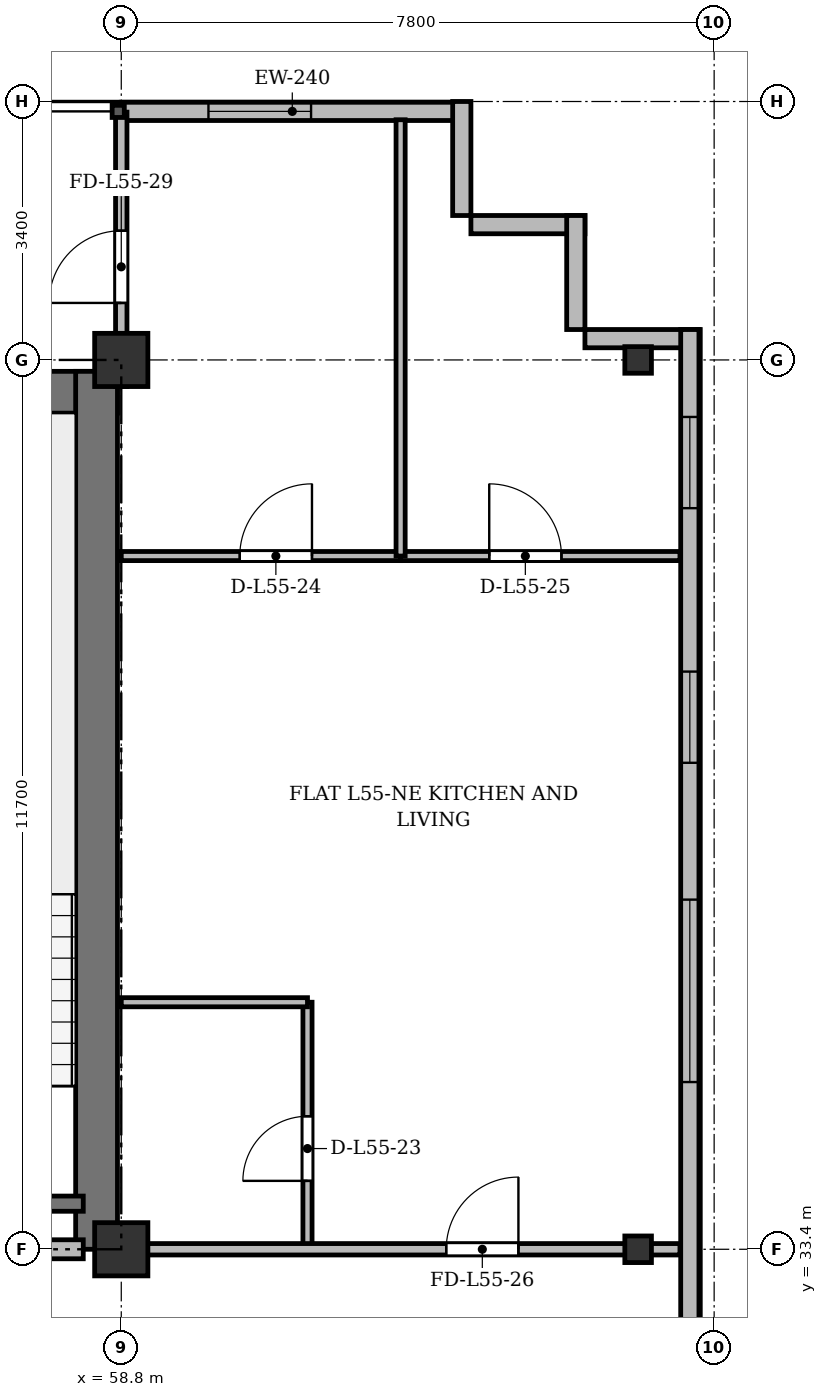
"""IFC4 building model, lengths in metres.
Left out: names, types, materials, properties, quantities, classifications, styles, units other than length and angle.
Written with IfcOpenShell. Run it as: python <this file> out.ifc"""

import sys

from ifc_helpers import new_model, si_unit, direction, frame, frame_2d, origin, origin_2d, place, context, subcontext, project, spatial, rectangle, i_section, extrude, source, transform, mapped, element, fill, save


model = new_model("IFC4")
c1 = context("Model", 3, precision=1e-05, world=origin(), true_north=direction((0.0, 1.0)))
c2 = subcontext(c1, "Body", "Model", "MODEL_VIEW")
j1 = project(units=[si_unit("LENGTHUNIT", "METRE"), si_unit("PLANEANGLEUNIT", "RADIAN")], contexts=[c1])
p1 = place(None, origin())
s1 = spatial("IfcSite", under=j1, at=p1, CompositionType="ELEMENT")
p2 = place(p1, origin())
s2 = spatial("IfcBuilding", under=s1, at=p2, CompositionType="ELEMENT")
p3 = place(p2, frame((0.0, 0.0, 212.1)))
s3 = spatial("IfcBuildingStorey", under=s2, at=p3, CompositionType="ELEMENT", Elevation=212.1)
m1 = source(origin(), c2, "Body", "SweptSolid", [
    extrude(rectangle(XDim=0.7, YDim=0.7, at=origin_2d()), origin(), (0.0, 0.0, 1.0), 3.6),
])
for number, where, z_axis, x_axis in (
    (1, (58.8, 33.4, 0.0), (0.0, 0.0, 1.0), (1.0, 0.0, 0.0)),
    (2, (58.8, 45.1, 0.0), (0.0, 0.0, 1.0), (1.0, 0.0, 0.0)),
):
    element("IfcColumn", number, at=place(p3, frame(where, z_axis=z_axis, x_axis=x_axis)), inside=s3, PredefinedType="COLUMN", context=c2, shape_type="MappedRepresentation", body=[
        mapped(m1, transform((0.0, 0.0, 0.0), x_axis=(1.0, 0.0, 0.0), y_axis=(0.0, 1.0, 0.0), z_axis=(0.0, 0.0, 1.0), scale=1.0)),
    ])
m2 = source(origin(), c2, "Body", "SweptSolid", [
    extrude(i_section(OverallWidth=0.35, OverallDepth=0.35, WebThickness=0.018, FlangeThickness=0.028, at=origin_2d()), origin(), (0.0, 0.0, 1.0), 3.6),
])
for number, where, z_axis, x_axis in (
    (3, (65.6, 33.4, 0.0), (0.0, 0.0, 1.0), (1.0, 0.0, 0.0)),
    (4, (65.6, 45.1, 0.0), (0.0, 0.0, 1.0), (1.0, 0.0, 0.0)),
):
    element("IfcColumn", number, at=place(p3, frame(where, z_axis=z_axis, x_axis=x_axis)), inside=s3, PredefinedType="COLUMN", context=c2, shape_type="MappedRepresentation", body=[
        mapped(m2, transform((0.0, 0.0, 0.0), x_axis=(1.0, 0.0, 0.0), y_axis=(0.0, 1.0, 0.0), z_axis=(0.0, 0.0, 1.0), scale=1.0)),
    ])
p4 = place(p3, frame((58.8, 48.37, 0.0), z_axis=(0.0, 0.0, 1.0), x_axis=(1.0, 0.0, 0.0)))
e5 = element("IfcWall", 5, at=p4, inside=s3, PredefinedType="SOLIDWALL", context=c2, shape_type="SweptSolid", body=[
    extrude(rectangle(XDim=4.5, YDim=0.24, at=frame_2d((2.25, 0.0))), origin(), (0.0, 0.0, 1.0), 3.36),
])
p5 = place(p4, frame((1.147, 0.0, 0.9)))
e6 = element("IfcOpeningElement", 6, at=p5, cuts=e5, PredefinedType="OPENING", context=c2, shape_type="SweptSolid", body=[
    extrude(rectangle(XDim=1.35, YDim=1.5, at=frame_2d((0.675, 0.75))), frame((0.0, 0.13, 0.0), z_axis=(0.0, -1.0, 0.0), x_axis=(1.0, 0.0, 0.0)), (0.0, 0.0, 1.0), 0.26),
])
for number, where, z_axis, x_axis in (
    (7, (63.28, 48.5, 0.0), (0.0, 0.0, 1.0), (0.0, -1.0, 0.0)),
    (8, (63.4, 46.88, 0.0), (0.0, 0.0, 1.0), (1.0, 0.0, 0.0)),
    (9, (64.78, 47.0, 0.0), (0.0, 0.0, 1.0), (0.0, -1.0, 0.0)),
    (10, (64.9, 45.38, 0.0), (0.0, 0.0, 1.0), (1.0, 0.0, 0.0)),
):
    element("IfcWall", number, at=place(p3, frame(where, z_axis=z_axis, x_axis=x_axis)), inside=s3, PredefinedType="SOLIDWALL", context=c2, shape_type="SweptSolid", body=[
        extrude(rectangle(XDim=1.5, YDim=0.24, at=frame_2d((0.75, 0.0))), origin(), (0.0, 0.0, 1.0), 3.36),
    ])
p6 = place(p3, frame((66.28, 45.5, 0.0), z_axis=(0.0, 0.0, 1.0), x_axis=(0.0, -1.0, 0.0)))
e11 = element("IfcWall", 11, at=p6, inside=s3, PredefinedType="SOLIDWALL", context=c2, shape_type="SweptSolid", body=[
    extrude(rectangle(XDim=39.1, YDim=0.24, at=frame_2d((19.55, 0.0))), origin(), (0.0, 0.0, 1.0), 3.36),
])
p7 = place(p6, frame((36.45, 0.0, 0.92)))
e12 = element("IfcOpeningElement", 12, at=p7, cuts=e11, PredefinedType="OPENING", context=c2, shape_type="SweptSolid", body=[
    extrude(rectangle(XDim=1.2, YDim=1.65, at=frame_2d((0.6, 0.825))), frame((0.0, 0.13, 0.0), z_axis=(0.0, -1.0, 0.0), x_axis=(1.0, 0.0, 0.0)), (0.0, 0.0, 1.0), 0.26),
])
p8 = place(p6, frame((32.9, 0.0, 0.92)))
e13 = element("IfcOpeningElement", 13, at=p8, cuts=e11, PredefinedType="OPENING", context=c2, shape_type="SweptSolid", body=[
    extrude(rectangle(XDim=2.4, YDim=2.1, at=frame_2d((1.2, 1.05))), frame((0.0, 0.13, 0.0), z_axis=(0.0, -1.0, 0.0), x_axis=(1.0, 0.0, 0.0)), (0.0, 0.0, 1.0), 0.26),
])
p9 = place(p6, frame((28.7, 0.0, 0.92)))
e14 = element("IfcOpeningElement", 14, at=p9, cuts=e11, PredefinedType="OPENING", context=c2, shape_type="SweptSolid", body=[
    extrude(rectangle(XDim=2.4, YDim=2.1, at=frame_2d((1.2, 1.05))), frame((0.0, 0.13, 0.0), z_axis=(0.0, -1.0, 0.0), x_axis=(1.0, 0.0, 0.0)), (0.0, 0.0, 1.0), 0.26),
])
p10 = place(p6, frame((21.5, 0.0, 0.92)))
e15 = element("IfcOpeningElement", 15, at=p10, cuts=e11, PredefinedType="OPENING", context=c2, shape_type="SweptSolid", body=[
    extrude(rectangle(XDim=2.4, YDim=2.1, at=frame_2d((1.2, 1.05))), frame((0.0, 0.13, 0.0), z_axis=(0.0, -1.0, 0.0), x_axis=(1.0, 0.0, 0.0)), (0.0, 0.0, 1.0), 0.26),
])
p11 = place(p6, frame((7.5, 0.0, 0.92)))
e16 = element("IfcOpeningElement", 16, at=p11, cuts=e11, PredefinedType="OPENING", context=c2, shape_type="SweptSolid", body=[
    extrude(rectangle(XDim=2.4, YDim=2.1, at=frame_2d((1.2, 1.05))), frame((0.0, 0.13, 0.0), z_axis=(0.0, -1.0, 0.0), x_axis=(1.0, 0.0, 0.0)), (0.0, 0.0, 1.0), 0.26),
])
p12 = place(p6, frame((4.5, 0.0, 0.92)))
e17 = element("IfcOpeningElement", 17, at=p12, cuts=e11, PredefinedType="OPENING", context=c2, shape_type="SweptSolid", body=[
    extrude(rectangle(XDim=1.2, YDim=1.65, at=frame_2d((0.6, 0.825))), frame((0.0, 0.13, 0.0), z_axis=(0.0, -1.0, 0.0), x_axis=(1.0, 0.0, 0.0)), (0.0, 0.0, 1.0), 0.26),
])
p13 = place(p6, frame((1.15, 0.0, 0.92)))
e18 = element("IfcOpeningElement", 18, at=p13, cuts=e11, PredefinedType="OPENING", context=c2, shape_type="SweptSolid", body=[
    extrude(rectangle(XDim=1.2, YDim=1.65, at=frame_2d((0.6, 0.825))), frame((0.0, 0.13, 0.0), z_axis=(0.0, -1.0, 0.0), x_axis=(1.0, 0.0, 0.0)), (0.0, 0.0, 1.0), 0.26),
])
p14 = place(p3, frame((15.65, 44.675, 0.0), z_axis=(0.0, 0.0, 1.0), x_axis=(1.0, 0.0, 0.0)))
e19 = element("IfcWall", 19, at=p14, inside=s3, PredefinedType="SHEAR", context=c2, shape_type="SweptSolid", body=[
    extrude(rectangle(XDim=43.1, YDim=0.55, at=frame_2d((21.55, 0.0))), origin(), (0.0, 0.0, 1.0), 3.36),
])
p15 = place(p3, frame((58.475, 33.4, 0.0), z_axis=(0.0, 0.0, 1.0), x_axis=(0.0, 1.0, 0.0)))
e20 = element("IfcWall", 20, at=p15, inside=s3, PredefinedType="SHEAR", context=c2, shape_type="SweptSolid", body=[
    extrude(rectangle(XDim=11.55, YDim=0.55, at=frame_2d((5.775, 0.0))), origin(), (0.0, 0.0, 1.0), 3.36),
])
p16 = place(p3, frame((54.9, 34.0, 0.0), z_axis=(0.0, 0.0, 1.0), x_axis=(1.0, 0.0, 0.0)))
e21 = element("IfcWall", 21, at=p16, inside=s3, PredefinedType="SHEAR", context=c2, shape_type="SweptSolid", body=[
    extrude(rectangle(XDim=3.4, YDim=0.2, at=frame_2d((1.7, 0.0))), origin(), (0.0, 0.0, 1.0), 3.36),
])
p17 = place(p3, frame((47.15, 33.4, 0.0), z_axis=(0.0, 0.0, 1.0), x_axis=(1.0, 0.0, 0.0)))
e22 = element("IfcWall", 22, at=p17, inside=s3, PredefinedType="PARTITIONING", context=c2, shape_type="SweptSolid", body=[
    extrude(rectangle(XDim=11.15, YDim=0.25, at=frame_2d((5.575, 0.0))), origin(), (0.0, 0.0, 1.0), 2.91),
])
p18 = place(p17, frame((0.7, 0.0, 0.0)))
e23 = element("IfcOpeningElement", 23, at=p18, cuts=e22, PredefinedType="OPENING", context=c2, shape_type="SweptSolid", body=[
    extrude(rectangle(XDim=0.95, YDim=2.15, at=frame_2d((0.475, 1.075))), frame((0.0, 0.135, 0.0), z_axis=(0.0, -1.0, 0.0), x_axis=(1.0, 0.0, 0.0)), (0.0, 0.0, 1.0), 0.27),
])
p19 = place(p17, frame((6.0, 0.0, 0.0)))
e24 = element("IfcOpeningElement", 24, at=p19, cuts=e22, PredefinedType="OPENING", context=c2, shape_type="SweptSolid", body=[
    extrude(rectangle(XDim=1.2, YDim=2.15, at=frame_2d((0.6, 1.075))), frame((0.0, 0.135, 0.0), z_axis=(0.0, -1.0, 0.0), x_axis=(1.0, 0.0, 0.0)), (0.0, 0.0, 1.0), 0.27),
])
p20 = place(p3, frame((61.25, 33.4, 0.0), z_axis=(0.0, 0.0, 1.0), x_axis=(0.0, 1.0, 0.0)))
e25 = element("IfcWall", 25, at=p20, inside=s3, PredefinedType="PARTITIONING", context=c2, shape_type="SweptSolid", body=[
    extrude(rectangle(XDim=3.25, YDim=0.12, at=frame_2d((1.625, 0.0))), origin(), (0.0, 0.0, 1.0), 2.91),
])
p21 = place(p20, frame((0.9, 0.0, 0.0)))
e26 = element("IfcOpeningElement", 26, at=p21, cuts=e25, PredefinedType="OPENING", context=c2, shape_type="SweptSolid", body=[
    extrude(rectangle(XDim=0.85, YDim=2.1, at=frame_2d((0.425, 1.05))), frame((0.0, 0.07, 0.0), z_axis=(0.0, -1.0, 0.0), x_axis=(1.0, 0.0, 0.0)), (0.0, 0.0, 1.0), 0.14),
])
p22 = place(p3, frame((58.8, 36.65, 0.0), z_axis=(0.0, 0.0, 1.0), x_axis=(1.0, 0.0, 0.0)))
e27 = element("IfcWall", 27, at=p22, inside=s3, PredefinedType="PARTITIONING", context=c2, shape_type="SweptSolid", body=[
    extrude(rectangle(XDim=2.45, YDim=0.12, at=frame_2d((1.225, 0.0))), origin(), (0.0, 0.0, 1.0), 2.86),
])
p23 = place(p3, frame((58.8, 42.52, 0.0), z_axis=(0.0, 0.0, 1.0), x_axis=(1.0, 0.0, 0.0)))
e28 = element("IfcWall", 28, at=p23, inside=s3, PredefinedType="PARTITIONING", context=c2, shape_type="SweptSolid", body=[
    extrude(rectangle(XDim=3.675, YDim=0.12, at=frame_2d((1.837, 0.0))), origin(), (0.0, 0.0, 1.0), 2.86),
])
p24 = place(p23, frame((1.559, 0.0, 0.0)))
e29 = element("IfcOpeningElement", 29, at=p24, cuts=e28, PredefinedType="OPENING", context=c2, shape_type="SweptSolid", body=[
    extrude(rectangle(XDim=0.95, YDim=2.15, at=frame_2d((0.475, 1.075))), frame((0.0, 0.07, 0.0), z_axis=(0.0, -1.0, 0.0), x_axis=(1.0, 0.0, 0.0)), (0.0, 0.0, 1.0), 0.14),
])
p25 = place(p3, frame((62.475, 42.52, 0.0), z_axis=(0.0, 0.0, 1.0), x_axis=(1.0, 0.0, 0.0)))
e30 = element("IfcWall", 30, at=p25, inside=s3, PredefinedType="PARTITIONING", context=c2, shape_type="SweptSolid", body=[
    extrude(rectangle(XDim=3.675, YDim=0.12, at=frame_2d((1.837, 0.0))), origin(), (0.0, 0.0, 1.0), 2.86),
])
p26 = place(p25, frame((1.166, 0.0, 0.0)))
e31 = element("IfcOpeningElement", 31, at=p26, cuts=e30, PredefinedType="OPENING", context=c2, shape_type="SweptSolid", body=[
    extrude(rectangle(XDim=0.95, YDim=2.15, at=frame_2d((0.475, 1.075))), frame((0.0, 0.07, 0.0), z_axis=(0.0, -1.0, 0.0), x_axis=(1.0, 0.0, 0.0)), (0.0, 0.0, 1.0), 0.14),
])
p27 = place(p3, frame((62.475, 42.52, 0.0), z_axis=(0.0, 0.0, 1.0), x_axis=(0.0, 1.0, 0.0)))
e32 = element("IfcWall", 32, at=p27, inside=s3, PredefinedType="PARTITIONING", context=c2, shape_type="SweptSolid", body=[
    extrude(rectangle(XDim=5.74, YDim=0.12, at=frame_2d((2.87, 0.0))), origin(), (0.0, 0.0, 1.0), 2.91),
])
p28 = place(p3, frame((58.8, 33.4, 0.0), z_axis=(0.0, 0.0, 1.0), x_axis=(1.0, 0.0, 0.0)))
e33 = element("IfcWall", 33, at=p28, inside=s3, PredefinedType="PARTITIONING", context=c2, shape_type="SweptSolid", body=[
    extrude(rectangle(XDim=7.35, YDim=0.15, at=frame_2d((3.675, 0.0))), origin(), (0.0, 0.0, 1.0), 2.91),
])
p29 = place(p28, frame((4.275, 0.0, 0.0)))
e34 = element("IfcOpeningElement", 34, at=p29, cuts=e33, PredefinedType="OPENING", context=c2, shape_type="SweptSolid", body=[
    extrude(rectangle(XDim=0.95, YDim=2.15, at=frame_2d((0.475, 1.075))), frame((0.0, 0.085, 0.0), z_axis=(0.0, -1.0, 0.0), x_axis=(1.0, 0.0, 0.0)), (0.0, 0.0, 1.0), 0.17),
])
p30 = place(p3, frame((58.8, 44.75, 0.0), z_axis=(0.0, 0.0, 1.0), x_axis=(0.0, 1.0, 0.0)))
e35 = element("IfcWall", 35, at=p30, inside=s3, PredefinedType="PARTITIONING", context=c2, shape_type="SweptSolid", body=[
    extrude(rectangle(XDim=3.61, YDim=0.15, at=frame_2d((1.805, 0.0))), origin(), (0.0, 0.0, 1.0), 2.86),
])
p31 = place(p30, frame((1.1, 0.0, 0.0)))
e36 = element("IfcOpeningElement", 36, at=p31, cuts=e35, PredefinedType="OPENING", context=c2, shape_type="SweptSolid", body=[
    extrude(rectangle(XDim=0.95, YDim=2.15, at=frame_2d((0.475, 1.075))), frame((0.0, 0.085, 0.0), z_axis=(0.0, -1.0, 0.0), x_axis=(1.0, 0.0, 0.0)), (0.0, 0.0, 1.0), 0.17),
])
m3 = source(origin(), c2, "Body", "SweptSolid", [
    extrude(rectangle(XDim=1.35, YDim=1.5, at=frame_2d((0.675, 0.75))), frame((0.0, 0.03, 0.0), z_axis=(0.0, -1.0, 0.0), x_axis=(1.0, 0.0, 0.0)), (0.0, 0.0, 1.0), 0.06),
])
p32 = place(p5, origin())
e37 = element("IfcWindow", 37, at=p32, inside=s3, PartitioningType="SINGLE_PANEL", PredefinedType="WINDOW", context=c2, shape_type="MappedRepresentation", body=[
    mapped(m3, transform((0.0, 0.0, 0.0), x_axis=(1.0, 0.0, 0.0), y_axis=(0.0, 1.0, 0.0), z_axis=(0.0, 0.0, 1.0), scale=1.0)),
])
fill(e6, e37)
m4 = source(origin(), c2, "Body", "SweptSolid", [
    extrude(rectangle(XDim=2.4, YDim=2.1, at=frame_2d((1.2, 1.05))), frame((0.0, 0.03, 0.0), z_axis=(0.0, -1.0, 0.0), x_axis=(1.0, 0.0, 0.0)), (0.0, 0.0, 1.0), 0.06),
])
p33 = place(p11, origin())
e38 = element("IfcWindow", 38, at=p33, inside=s3, PartitioningType="SINGLE_PANEL", PredefinedType="WINDOW", context=c2, shape_type="MappedRepresentation", body=[
    mapped(m4, transform((0.0, 0.0, 0.0), x_axis=(1.0, 0.0, 0.0), y_axis=(0.0, 1.0, 0.0), z_axis=(0.0, 0.0, 1.0), scale=1.0)),
])
fill(e16, e38)
m5 = source(origin(), c2, "Body", "SweptSolid", [
    extrude(rectangle(XDim=1.2, YDim=1.65, at=frame_2d((0.6, 0.825))), frame((0.0, 0.03, 0.0), z_axis=(0.0, -1.0, 0.0), x_axis=(1.0, 0.0, 0.0)), (0.0, 0.0, 1.0), 0.06),
])
p34 = place(p12, origin())
e39 = element("IfcWindow", 39, at=p34, inside=s3, PartitioningType="SINGLE_PANEL", PredefinedType="WINDOW", context=c2, shape_type="MappedRepresentation", body=[
    mapped(m5, transform((0.0, 0.0, 0.0), x_axis=(1.0, 0.0, 0.0), y_axis=(0.0, 1.0, 0.0), z_axis=(0.0, 0.0, 1.0), scale=1.0)),
])
fill(e17, e39)
p35 = place(p13, origin())
e40 = element("IfcWindow", 40, at=p35, inside=s3, PartitioningType="SINGLE_PANEL", PredefinedType="WINDOW", context=c2, shape_type="MappedRepresentation", body=[
    mapped(m5, transform((0.0, 0.0, 0.0), x_axis=(1.0, 0.0, 0.0), y_axis=(0.0, 1.0, 0.0), z_axis=(0.0, 0.0, 1.0), scale=1.0)),
])
fill(e18, e40)
m6 = source(origin(), c2, "Body", "SweptSolid", [
    extrude(rectangle(XDim=0.85, YDim=2.1, at=frame_2d((0.425, 1.05))), frame((0.0, 0.025, 0.0), z_axis=(0.0, -1.0, 0.0), x_axis=(1.0, 0.0, 0.0)), (0.0, 0.0, 1.0), 0.05),
])
p36 = place(p21, origin())
e41 = element("IfcDoor", 41, at=p36, inside=s3, OperationType="SINGLE_SWING_LEFT", PredefinedType="DOOR", context=c2, shape_type="MappedRepresentation", body=[
    mapped(m6, transform((0.0, 0.0, 0.0), x_axis=(1.0, 0.0, 0.0), y_axis=(0.0, 1.0, 0.0), z_axis=(0.0, 0.0, 1.0), scale=1.0)),
])
fill(e26, e41)
m7 = source(origin(), c2, "Body", "SweptSolid", [
    extrude(rectangle(XDim=0.95, YDim=2.15, at=frame_2d((0.475, 1.075))), frame((0.0, 0.025, 0.0), z_axis=(0.0, -1.0, 0.0), x_axis=(1.0, 0.0, 0.0)), (0.0, 0.0, 1.0), 0.05),
])
p37 = place(p24, origin())
e42 = element("IfcDoor", 42, at=p37, inside=s3, OperationType="SINGLE_SWING_RIGHT", PredefinedType="DOOR", context=c2, shape_type="MappedRepresentation", body=[
    mapped(m7, transform((0.0, 0.0, 0.0), x_axis=(1.0, 0.0, 0.0), y_axis=(0.0, 1.0, 0.0), z_axis=(0.0, 0.0, 1.0), scale=1.0)),
])
fill(e29, e42)
p38 = place(p26, origin())
e43 = element("IfcDoor", 43, at=p38, inside=s3, OperationType="SINGLE_SWING_LEFT", PredefinedType="DOOR", context=c2, shape_type="MappedRepresentation", body=[
    mapped(m7, transform((0.0, 0.0, 0.0), x_axis=(1.0, 0.0, 0.0), y_axis=(0.0, 1.0, 0.0), z_axis=(0.0, 0.0, 1.0), scale=1.0)),
])
fill(e31, e43)
p39 = place(p29, origin())
e44 = element("IfcDoor", 44, at=p39, inside=s3, OperationType="SINGLE_SWING_RIGHT", PredefinedType="DOOR", context=c2, shape_type="MappedRepresentation", body=[
    mapped(m7, transform((0.0, 0.0, 0.0), x_axis=(1.0, 0.0, 0.0), y_axis=(0.0, 1.0, 0.0), z_axis=(0.0, 0.0, 1.0), scale=1.0)),
])
fill(e34, e44)
p40 = place(p31, origin())
e45 = element("IfcDoor", 45, at=p40, inside=s3, OperationType="SINGLE_SWING_LEFT", PredefinedType="DOOR", context=c2, shape_type="MappedRepresentation", body=[
    mapped(m7, transform((0.0, 0.0, 0.0), x_axis=(1.0, 0.0, 0.0), y_axis=(0.0, 1.0, 0.0), z_axis=(0.0, 0.0, 1.0), scale=1.0)),
])
fill(e36, e45)
save(model, sys.argv[1])
